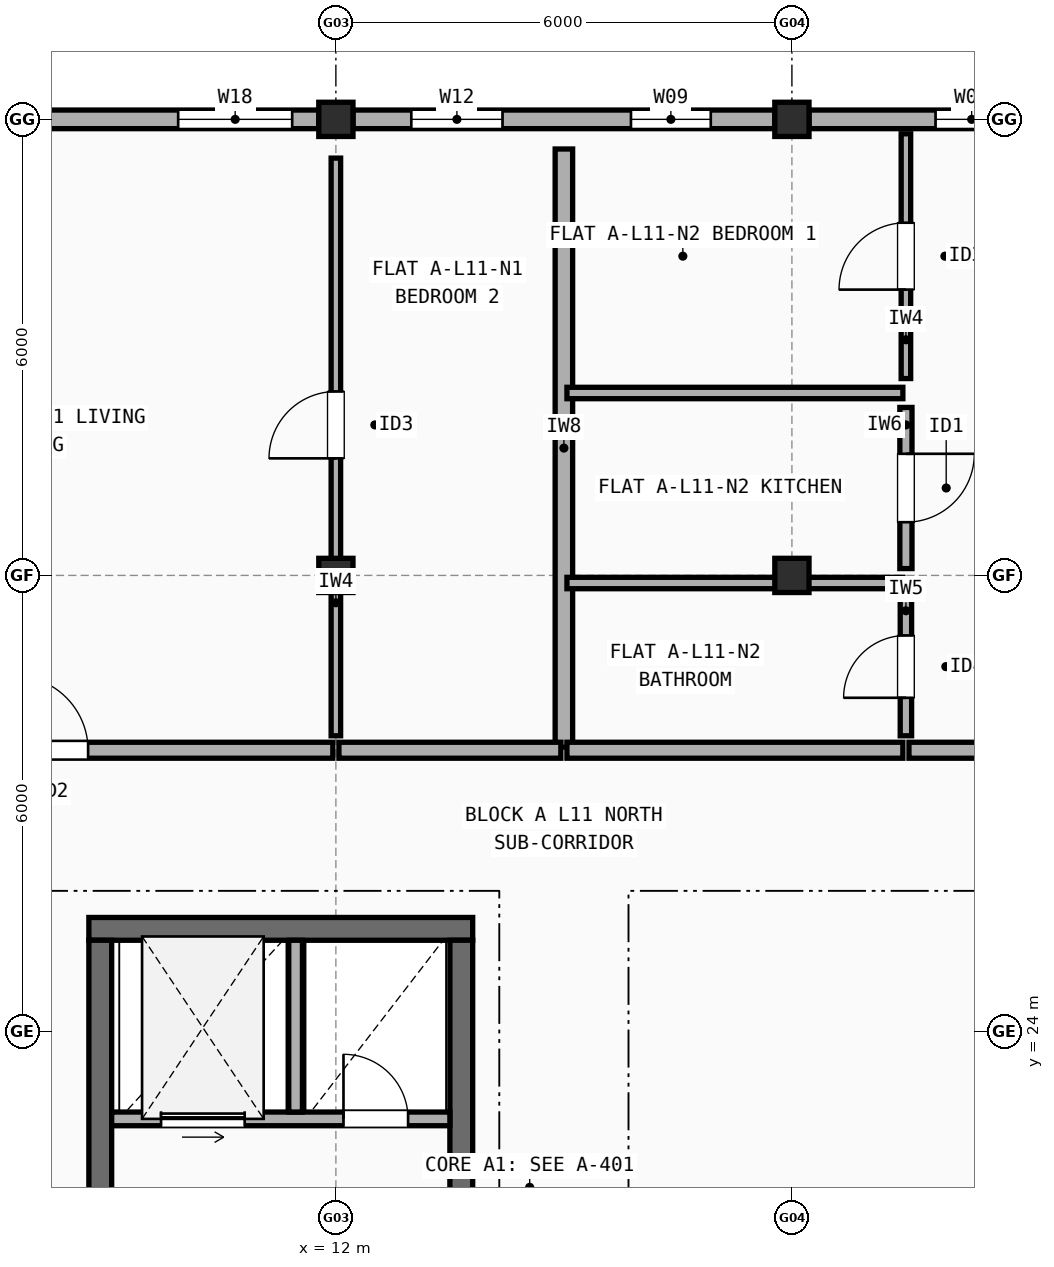
"""IFC4 building model, lengths in metres.
Left out: names, types, materials, properties, quantities, classifications, styles, units other than length and angle.
Written with IfcOpenShell. Run it as: python <this file> out.ifc"""

import sys

from ifc_helpers import new_model, si_unit, direction, frame, frame_2d, origin, origin_2d, place, context, subcontext, project, spatial, rectangle, extrude, element, fill, save


model = new_model("IFC4")
c1 = context("Model", 3, precision=1e-05, world=origin(), true_north=direction((0.0, 1.0)))
c2 = subcontext(c1, "Body", "Model", "MODEL_VIEW")
j1 = project(units=[si_unit("LENGTHUNIT", "METRE"), si_unit("PLANEANGLEUNIT", "RADIAN")], contexts=[c1])
p1 = place(None, origin())
s1 = spatial("IfcSite", under=j1, at=p1, CompositionType="ELEMENT")
p2 = place(p1, origin())
s2 = spatial("IfcBuilding", under=s1, at=p2, CompositionType="ELEMENT")
p3 = place(p2, frame((0.0, 0.0, 36.5)))
s3 = spatial("IfcBuildingStorey", under=s2, at=p3, CompositionType="ELEMENT", Elevation=36.5)
for number, where, z_axis, x_axis in (
    (1, (12.0, 30.0, 0.0), (0.0, 0.0, 1.0), (1.0, 0.0, 0.0)),
    (2, (12.0, 36.0, 0.0), (0.0, 0.0, 1.0), (1.0, 0.0, 0.0)),
    (3, (18.0, 30.0, 0.0), (0.0, 0.0, 1.0), (1.0, 0.0, 0.0)),
    (4, (18.0, 36.0, 0.0), (0.0, 0.0, 1.0), (1.0, 0.0, 0.0)),
):
    element("IfcColumn", number, at=place(p3, frame(where, z_axis=z_axis, x_axis=x_axis)), inside=s3, PredefinedType="COLUMN", context=c2, shape_type="SweptSolid", body=[
        extrude(rectangle(XDim=0.45, YDim=0.45, at=origin_2d()), origin(), (0.0, 0.0, 1.0), 2.995),
    ])
p4 = place(p3, frame((23.775, 36.0, 0.0), z_axis=(0.0, 0.0, 1.0), x_axis=(-1.0, 0.0, 0.0)))
e5 = element("IfcWall", 5, at=p4, inside=s3, PredefinedType="STANDARD", context=c2, shape_type="SweptSolid", body=[
    extrude(rectangle(XDim=5.55, YDim=0.245, at=frame_2d((2.775, 0.0))), origin(), (0.0, 0.0, 1.0), 2.477),
])
p5 = place(p4, frame((0.35, 0.0, 0.9)))
e6 = element("IfcOpeningElement", 6, at=p5, cuts=e5, PredefinedType="OPENING", context=c2, shape_type="SweptSolid", body=[
    extrude(rectangle(XDim=0.95, YDim=1.35, at=frame_2d((0.475, 0.675))), frame((0.0, 0.133, 0.0), z_axis=(0.0, -1.0, 0.0), x_axis=(1.0, 0.0, 0.0)), (0.0, 0.0, 1.0), 0.265),
])
p6 = place(p4, frame((2.935, 0.0, 0.9)))
e7 = element("IfcOpeningElement", 7, at=p6, cuts=e5, PredefinedType="OPENING", context=c2, shape_type="SweptSolid", body=[
    extrude(rectangle(XDim=0.95, YDim=1.35, at=frame_2d((0.475, 0.675))), frame((0.0, 0.133, 0.0), z_axis=(0.0, -1.0, 0.0), x_axis=(1.0, 0.0, 0.0)), (0.0, 0.0, 1.0), 0.265),
])
p7 = place(p3, frame((17.775, 36.0, 0.0), z_axis=(0.0, 0.0, 1.0), x_axis=(-1.0, 0.0, 0.0)))
e8 = element("IfcWall", 8, at=p7, inside=s3, PredefinedType="STANDARD", context=c2, shape_type="SweptSolid", body=[
    extrude(rectangle(XDim=5.55, YDim=0.245, at=frame_2d((2.775, 0.0))), origin(), (0.0, 0.0, 1.0), 2.477),
])
p8 = place(p7, frame((0.843, 0.0, 0.9)))
e9 = element("IfcOpeningElement", 9, at=p8, cuts=e8, PredefinedType="OPENING", context=c2, shape_type="SweptSolid", body=[
    extrude(rectangle(XDim=1.05, YDim=1.35, at=frame_2d((0.525, 0.675))), frame((0.0, 0.133, 0.0), z_axis=(0.0, -1.0, 0.0), x_axis=(1.0, 0.0, 0.0)), (0.0, 0.0, 1.0), 0.265),
])
p9 = place(p7, frame((3.583, 0.0, 0.9)))
e10 = element("IfcOpeningElement", 10, at=p9, cuts=e8, PredefinedType="OPENING", context=c2, shape_type="SweptSolid", body=[
    extrude(rectangle(XDim=1.2, YDim=1.35, at=frame_2d((0.6, 0.675))), frame((0.0, 0.133, 0.0), z_axis=(0.0, -1.0, 0.0), x_axis=(1.0, 0.0, 0.0)), (0.0, 0.0, 1.0), 0.265),
])
p10 = place(p3, frame((11.775, 36.0, 0.0), z_axis=(0.0, 0.0, 1.0), x_axis=(-1.0, 0.0, 0.0)))
e11 = element("IfcWall", 11, at=p10, inside=s3, PredefinedType="STANDARD", context=c2, shape_type="SweptSolid", body=[
    extrude(rectangle(XDim=5.55, YDim=0.245, at=frame_2d((2.775, 0.0))), origin(), (0.0, 0.0, 1.0), 2.477),
])
p11 = place(p10, frame((0.35, 0.0, 0.9)))
e12 = element("IfcOpeningElement", 12, at=p11, cuts=e11, PredefinedType="OPENING", context=c2, shape_type="SweptSolid", body=[
    extrude(rectangle(XDim=1.5, YDim=1.4, at=frame_2d((0.75, 0.7))), frame((0.0, 0.133, 0.0), z_axis=(0.0, -1.0, 0.0), x_axis=(1.0, 0.0, 0.0)), (0.0, 0.0, 1.0), 0.265),
])
p12 = place(p10, frame((3.7, 0.0, 0.9)))
e13 = element("IfcOpeningElement", 13, at=p12, cuts=e11, PredefinedType="OPENING", context=c2, shape_type="SweptSolid", body=[
    extrude(rectangle(XDim=1.5, YDim=1.4, at=frame_2d((0.75, 0.7))), frame((0.0, 0.133, 0.0), z_axis=(0.0, -1.0, 0.0), x_axis=(1.0, 0.0, 0.0)), (0.0, 0.0, 1.0), 0.265),
])
p13 = place(p3, frame((13.8, 25.35, 0.0), z_axis=(0.0, 0.0, 1.0), x_axis=(-1.0, 0.0, 0.0)))
e14 = element("IfcWall", 14, at=p13, inside=s3, PredefinedType="SHEAR", context=c2, shape_type="SweptSolid", body=[
    extrude(rectangle(XDim=5.05, YDim=0.3, at=frame_2d((2.525, 0.0))), origin(), (0.0, 0.0, 1.0), 2.995),
])
p14 = place(p3, frame((13.65, 18.75, 0.0), z_axis=(0.0, 0.0, 1.0), x_axis=(0.0, 1.0, 0.0)))
e15 = element("IfcWall", 15, at=p14, inside=s3, PredefinedType="SHEAR", context=c2, shape_type="SweptSolid", body=[
    extrude(rectangle(XDim=6.45, YDim=0.3, at=frame_2d((3.225, 0.0))), origin(), (0.0, 0.0, 1.0), 2.995),
])
p15 = place(p3, frame((8.9, 21.75, 0.0), z_axis=(0.0, 0.0, 1.0), x_axis=(0.0, 1.0, 0.0)))
e16 = element("IfcWall", 16, at=p15, inside=s3, PredefinedType="SHEAR", context=c2, shape_type="SweptSolid", body=[
    extrude(rectangle(XDim=3.45, YDim=0.3, at=frame_2d((1.725, 0.0))), origin(), (0.0, 0.0, 1.0), 2.995),
])
p16 = place(p3, frame((9.05, 22.85, 0.0), z_axis=(0.0, 0.0, 1.0), x_axis=(1.0, 0.0, 0.0)))
e17 = element("IfcWall", 17, at=p16, inside=s3, PredefinedType="SOLIDWALL", context=c2, shape_type="SweptSolid", body=[
    extrude(rectangle(XDim=4.45, YDim=0.18, at=frame_2d((2.225, 0.0))), origin(), (0.0, 0.0, 1.0), 2.995),
])
p17 = place(p16, frame((0.65, 0.0, 0.0)))
e18 = element("IfcOpeningElement", 18, at=p17, cuts=e17, PredefinedType="OPENING", context=c2, shape_type="SweptSolid", body=[
    extrude(rectangle(XDim=1.1, YDim=2.15, at=frame_2d((0.55, 1.075))), frame((0.0, 0.1, 0.0), z_axis=(0.0, -1.0, 0.0), x_axis=(1.0, 0.0, 0.0)), (0.0, 0.0, 1.0), 0.2),
])
p18 = place(p16, frame((3.05, 0.0, 0.0)))
e19 = element("IfcOpeningElement", 19, at=p18, cuts=e17, PredefinedType="OPENING", context=c2, shape_type="SweptSolid", body=[
    extrude(rectangle(XDim=0.85, YDim=2.1, at=frame_2d((0.425, 1.05))), frame((0.0, 0.1, 0.0), z_axis=(0.0, -1.0, 0.0), x_axis=(1.0, 0.0, 0.0)), (0.0, 0.0, 1.0), 0.2),
])
p19 = place(p3, frame((11.47, 22.94, 0.0), z_axis=(0.0, 0.0, 1.0), x_axis=(0.0, 1.0, 0.0)))
e20 = element("IfcWall", 20, at=p19, inside=s3, PredefinedType="SOLIDWALL", context=c2, shape_type="SweptSolid", body=[
    extrude(rectangle(XDim=2.26, YDim=0.18, at=frame_2d((1.13, 0.0))), origin(), (0.0, 0.0, 1.0), 2.995),
])
p20 = place(p3, frame((15.0, 27.74, 0.0), z_axis=(0.0, 0.0, 1.0), x_axis=(0.0, 1.0, 0.0)))
e21 = element("IfcWall", 21, at=p20, inside=s3, PredefinedType="SOLIDWALL", context=c2, shape_type="SweptSolid", body=[
    extrude(rectangle(XDim=7.87, YDim=0.23, at=frame_2d((3.935, 0.0))), origin(), (0.0, 0.0, 1.0), 2.527),
])
p21 = place(p3, frame((4.54, 27.7, 0.0), z_axis=(0.0, 0.0, 1.0), x_axis=(1.0, 0.0, 0.0)))
e22 = element("IfcWall", 22, at=p21, inside=s3, PredefinedType="SOLIDWALL", context=c2, shape_type="SweptSolid", body=[
    extrude(rectangle(XDim=7.42, YDim=0.21, at=frame_2d((3.71, 0.0))), origin(), (0.0, 0.0, 1.0), 2.508),
])
p22 = place(p21, frame((3.22, 0.0, 0.0)))
e23 = element("IfcOpeningElement", 23, at=p22, cuts=e22, PredefinedType="OPENING", context=c2, shape_type="SweptSolid", body=[
    extrude(rectangle(XDim=0.98, YDim=2.15, at=frame_2d((0.49, 1.075))), frame((0.0, 0.115, 0.0), z_axis=(0.0, -1.0, 0.0), x_axis=(1.0, 0.0, 0.0)), (0.0, 0.0, 1.0), 0.23),
])
p23 = place(p3, frame((12.04, 27.7, 0.0), z_axis=(0.0, 0.0, 1.0), x_axis=(1.0, 0.0, 0.0)))
e24 = element("IfcWall", 24, at=p23, inside=s3, PredefinedType="SOLIDWALL", context=c2, shape_type="SweptSolid", body=[
    extrude(rectangle(XDim=2.92, YDim=0.21, at=frame_2d((1.46, 0.0))), origin(), (0.0, 0.0, 1.0), 2.508),
])
p24 = place(p3, frame((12.0, 27.89, 0.0), z_axis=(0.0, 0.0, 1.0), x_axis=(0.0, 1.0, 0.0)))
e25 = element("IfcWall", 25, at=p24, inside=s3, PredefinedType="PARTITIONING", context=c2, shape_type="SweptSolid", body=[
    extrude(rectangle(XDim=7.6, YDim=0.125, at=frame_2d((3.8, 0.0))), origin(), (0.0, 0.0, 1.0), 2.508),
])
p25 = place(p24, frame((3.65, 0.0, 0.0)))
e26 = element("IfcOpeningElement", 26, at=p25, cuts=e25, PredefinedType="OPENING", context=c2, shape_type="SweptSolid", body=[
    extrude(rectangle(XDim=0.88, YDim=2.1, at=frame_2d((0.44, 1.05))), frame((0.0, 0.073, 0.0), z_axis=(0.0, -1.0, 0.0), x_axis=(1.0, 0.0, 0.0)), (0.0, 0.0, 1.0), 0.145),
])
p26 = place(p3, frame((15.04, 27.7, 0.0), z_axis=(0.0, 0.0, 1.0), x_axis=(1.0, 0.0, 0.0)))
e27 = element("IfcWall", 27, at=p26, inside=s3, PredefinedType="SOLIDWALL", context=c2, shape_type="SweptSolid", body=[
    extrude(rectangle(XDim=4.42, YDim=0.21, at=frame_2d((2.21, 0.0))), origin(), (0.0, 0.0, 1.0), 2.995),
])
p27 = place(p3, frame((19.54, 27.7, 0.0), z_axis=(0.0, 0.0, 1.0), x_axis=(1.0, 0.0, 0.0)))
e28 = element("IfcWall", 28, at=p27, inside=s3, PredefinedType="SOLIDWALL", context=c2, shape_type="SweptSolid", body=[
    extrude(rectangle(XDim=7.42, YDim=0.21, at=frame_2d((3.71, 0.0))), origin(), (0.0, 0.0, 1.0), 2.995),
])
p28 = place(p27, frame((3.21, 0.0, 0.0)))
e29 = element("IfcOpeningElement", 29, at=p28, cuts=e28, PredefinedType="OPENING", context=c2, shape_type="SweptSolid", body=[
    extrude(rectangle(XDim=1.0, YDim=2.15, at=frame_2d((0.5, 1.075))), frame((0.0, 0.115, 0.0), z_axis=(0.0, -1.0, 0.0), x_axis=(1.0, 0.0, 0.0)), (0.0, 0.0, 1.0), 0.23),
])
p29 = place(p3, frame((19.5, 32.59, 0.0), z_axis=(0.0, 0.0, 1.0), x_axis=(0.0, 1.0, 0.0)))
e30 = element("IfcWall", 30, at=p29, inside=s3, PredefinedType="PARTITIONING", context=c2, shape_type="SweptSolid", body=[
    extrude(rectangle(XDim=3.22, YDim=0.125, at=frame_2d((1.61, 0.0))), origin(), (0.0, 0.0, 1.0), 2.995),
])
p30 = place(p29, frame((1.17, 0.0, 0.0)))
e31 = element("IfcOpeningElement", 31, at=p30, cuts=e30, PredefinedType="OPENING", context=c2, shape_type="SweptSolid", body=[
    extrude(rectangle(XDim=0.88, YDim=2.1, at=frame_2d((0.44, 1.05))), frame((0.0, 0.073, 0.0), z_axis=(0.0, -1.0, 0.0), x_axis=(1.0, 0.0, 0.0)), (0.0, 0.0, 1.0), 0.145),
])
p31 = place(p3, frame((19.5, 30.09, 0.0), z_axis=(0.0, 0.0, 1.0), x_axis=(0.0, 1.0, 0.0)))
e32 = element("IfcWall", 32, at=p31, inside=s3, PredefinedType="PLUMBINGWALL", context=c2, shape_type="SweptSolid", body=[
    extrude(rectangle(XDim=2.12, YDim=0.16, at=frame_2d((1.06, 0.0))), origin(), (0.0, 0.0, 1.0), 2.527),
])
p32 = place(p31, frame((0.61, 0.0, 0.0)))
e33 = element("IfcOpeningElement", 33, at=p32, cuts=e32, PredefinedType="OPENING", context=c2, shape_type="SweptSolid", body=[
    extrude(rectangle(XDim=0.9, YDim=2.1, at=frame_2d((0.45, 1.05))), frame((0.0, 0.09, 0.0), z_axis=(0.0, -1.0, 0.0), x_axis=(1.0, 0.0, 0.0)), (0.0, 0.0, 1.0), 0.18),
])
p33 = place(p3, frame((19.5, 27.89, 0.0), z_axis=(0.0, 0.0, 1.0), x_axis=(0.0, 1.0, 0.0)))
e34 = element("IfcWall", 34, at=p33, inside=s3, PredefinedType="PARTITIONING", context=c2, shape_type="SweptSolid", body=[
    extrude(rectangle(XDim=1.82, YDim=0.15, at=frame_2d((0.91, 0.0))), origin(), (0.0, 0.0, 1.0), 2.995),
])
p34 = place(p33, frame((0.5, 0.0, 0.0)))
e35 = element("IfcOpeningElement", 35, at=p34, cuts=e34, PredefinedType="OPENING", context=c2, shape_type="SweptSolid", body=[
    extrude(rectangle(XDim=0.82, YDim=2.08, at=frame_2d((0.41, 1.04))), frame((0.0, 0.085, 0.0), z_axis=(0.0, -1.0, 0.0), x_axis=(1.0, 0.0, 0.0)), (0.0, 0.0, 1.0), 0.17),
])
p35 = place(p3, frame((15.04, 32.4, 0.0), z_axis=(0.0, 0.0, 1.0), x_axis=(1.0, 0.0, 0.0)))
e36 = element("IfcWall", 36, at=p35, inside=s3, PredefinedType="PARTITIONING", context=c2, shape_type="SweptSolid", body=[
    extrude(rectangle(XDim=4.42, YDim=0.15, at=frame_2d((2.21, 0.0))), origin(), (0.0, 0.0, 1.0), 2.508),
])
p36 = place(p3, frame((15.04, 29.9, 0.0), z_axis=(0.0, 0.0, 1.0), x_axis=(1.0, 0.0, 0.0)))
e37 = element("IfcWall", 37, at=p36, inside=s3, PredefinedType="PARTITIONING", context=c2, shape_type="SweptSolid", body=[
    extrude(rectangle(XDim=4.42, YDim=0.15, at=frame_2d((2.21, 0.0))), origin(), (0.0, 0.0, 1.0), 2.527),
])
p37 = place(p6, origin())
e38 = element("IfcWindow", 38, at=p37, inside=s3, PartitioningType="SINGLE_PANEL", PredefinedType="WINDOW", context=c2, shape_type="SweptSolid", body=[
    extrude(rectangle(XDim=0.95, YDim=1.35, at=frame_2d((0.475, 0.675))), frame((0.0, 0.03, 0.0), z_axis=(0.0, -1.0, 0.0), x_axis=(1.0, 0.0, 0.0)), (0.0, 0.0, 1.0), 0.06),
])
fill(e7, e38)
p38 = place(p8, origin())
e39 = element("IfcWindow", 39, at=p38, inside=s3, PartitioningType="SINGLE_PANEL", PredefinedType="WINDOW", context=c2, shape_type="SweptSolid", body=[
    extrude(rectangle(XDim=1.05, YDim=1.35, at=frame_2d((0.525, 0.675))), frame((0.0, 0.03, 0.0), z_axis=(0.0, -1.0, 0.0), x_axis=(1.0, 0.0, 0.0)), (0.0, 0.0, 1.0), 0.06),
])
fill(e9, e39)
p39 = place(p9, origin())
e40 = element("IfcWindow", 40, at=p39, inside=s3, PartitioningType="SINGLE_PANEL", PredefinedType="WINDOW", context=c2, shape_type="SweptSolid", body=[
    extrude(rectangle(XDim=1.2, YDim=1.35, at=frame_2d((0.6, 0.675))), frame((0.0, 0.03, 0.0), z_axis=(0.0, -1.0, 0.0), x_axis=(1.0, 0.0, 0.0)), (0.0, 0.0, 1.0), 0.06),
])
fill(e10, e40)
p40 = place(p11, origin())
e41 = element("IfcWindow", 41, at=p40, inside=s3, PartitioningType="SINGLE_PANEL", PredefinedType="WINDOW", context=c2, shape_type="SweptSolid", body=[
    extrude(rectangle(XDim=1.5, YDim=1.4, at=frame_2d((0.75, 0.7))), frame((0.0, 0.03, 0.0), z_axis=(0.0, -1.0, 0.0), x_axis=(1.0, 0.0, 0.0)), (0.0, 0.0, 1.0), 0.06),
])
fill(e12, e41)
p41 = place(p17, origin())
e42 = element("IfcDoor", 42, at=p41, inside=s3, OperationType="SLIDING_TO_LEFT", PredefinedType="DOOR", context=c2, shape_type="SweptSolid", body=[
    extrude(rectangle(XDim=1.1, YDim=2.15, at=frame_2d((0.55, 1.075))), frame((0.0, 0.025, 0.0), z_axis=(0.0, -1.0, 0.0), x_axis=(1.0, 0.0, 0.0)), (0.0, 0.0, 1.0), 0.05),
])
fill(e18, e42)
p42 = place(p18, frame((0.85, 0.0, 0.0), z_axis=(0.0, 0.0, 1.0), x_axis=(-1.0, 0.0, 0.0)))
e43 = element("IfcDoor", 43, at=p42, inside=s3, OperationType="SINGLE_SWING_LEFT", PredefinedType="DOOR", context=c2, shape_type="SweptSolid", body=[
    extrude(rectangle(XDim=0.85, YDim=2.1, at=frame_2d((0.425, 1.05))), frame((0.0, 0.025, 0.0), z_axis=(0.0, -1.0, 0.0), x_axis=(1.0, 0.0, 0.0)), (0.0, 0.0, 1.0), 0.05),
])
fill(e19, e43)
p43 = place(p22, origin())
e44 = element("IfcDoor", 44, at=p43, inside=s3, OperationType="SINGLE_SWING_LEFT", PredefinedType="DOOR", context=c2, shape_type="SweptSolid", body=[
    extrude(rectangle(XDim=0.98, YDim=2.15, at=frame_2d((0.49, 1.075))), frame((0.0, 0.025, 0.0), z_axis=(0.0, -1.0, 0.0), x_axis=(1.0, 0.0, 0.0)), (0.0, 0.0, 1.0), 0.05),
])
fill(e23, e44)
p44 = place(p25, origin())
e45 = element("IfcDoor", 45, at=p44, inside=s3, OperationType="SINGLE_SWING_LEFT", PredefinedType="DOOR", context=c2, shape_type="SweptSolid", body=[
    extrude(rectangle(XDim=0.88, YDim=2.1, at=frame_2d((0.44, 1.05))), frame((0.0, 0.025, 0.0), z_axis=(0.0, -1.0, 0.0), x_axis=(1.0, 0.0, 0.0)), (0.0, 0.0, 1.0), 0.05),
])
fill(e26, e45)
p45 = place(p30, origin())
e46 = element("IfcDoor", 46, at=p45, inside=s3, OperationType="SINGLE_SWING_LEFT", PredefinedType="DOOR", context=c2, shape_type="SweptSolid", body=[
    extrude(rectangle(XDim=0.88, YDim=2.1, at=frame_2d((0.44, 1.05))), frame((0.0, 0.025, 0.0), z_axis=(0.0, -1.0, 0.0), x_axis=(1.0, 0.0, 0.0)), (0.0, 0.0, 1.0), 0.05),
])
fill(e31, e46)
p46 = place(p32, origin())
e47 = element("IfcDoor", 47, at=p46, inside=s3, OperationType="SINGLE_SWING_RIGHT", PredefinedType="DOOR", context=c2, shape_type="SweptSolid", body=[
    extrude(rectangle(XDim=0.9, YDim=2.1, at=frame_2d((0.45, 1.05))), frame((0.0, 0.025, 0.0), z_axis=(0.0, -1.0, 0.0), x_axis=(1.0, 0.0, 0.0)), (0.0, 0.0, 1.0), 0.05),
])
fill(e33, e47)
p47 = place(p34, origin())
e48 = element("IfcDoor", 48, at=p47, inside=s3, OperationType="SINGLE_SWING_LEFT", PredefinedType="DOOR", context=c2, shape_type="SweptSolid", body=[
    extrude(rectangle(XDim=0.82, YDim=2.08, at=frame_2d((0.41, 1.04))), frame((0.0, 0.025, 0.0), z_axis=(0.0, -1.0, 0.0), x_axis=(1.0, 0.0, 0.0)), (0.0, 0.0, 1.0), 0.05),
])
fill(e35, e48)
save(model, sys.argv[1])
